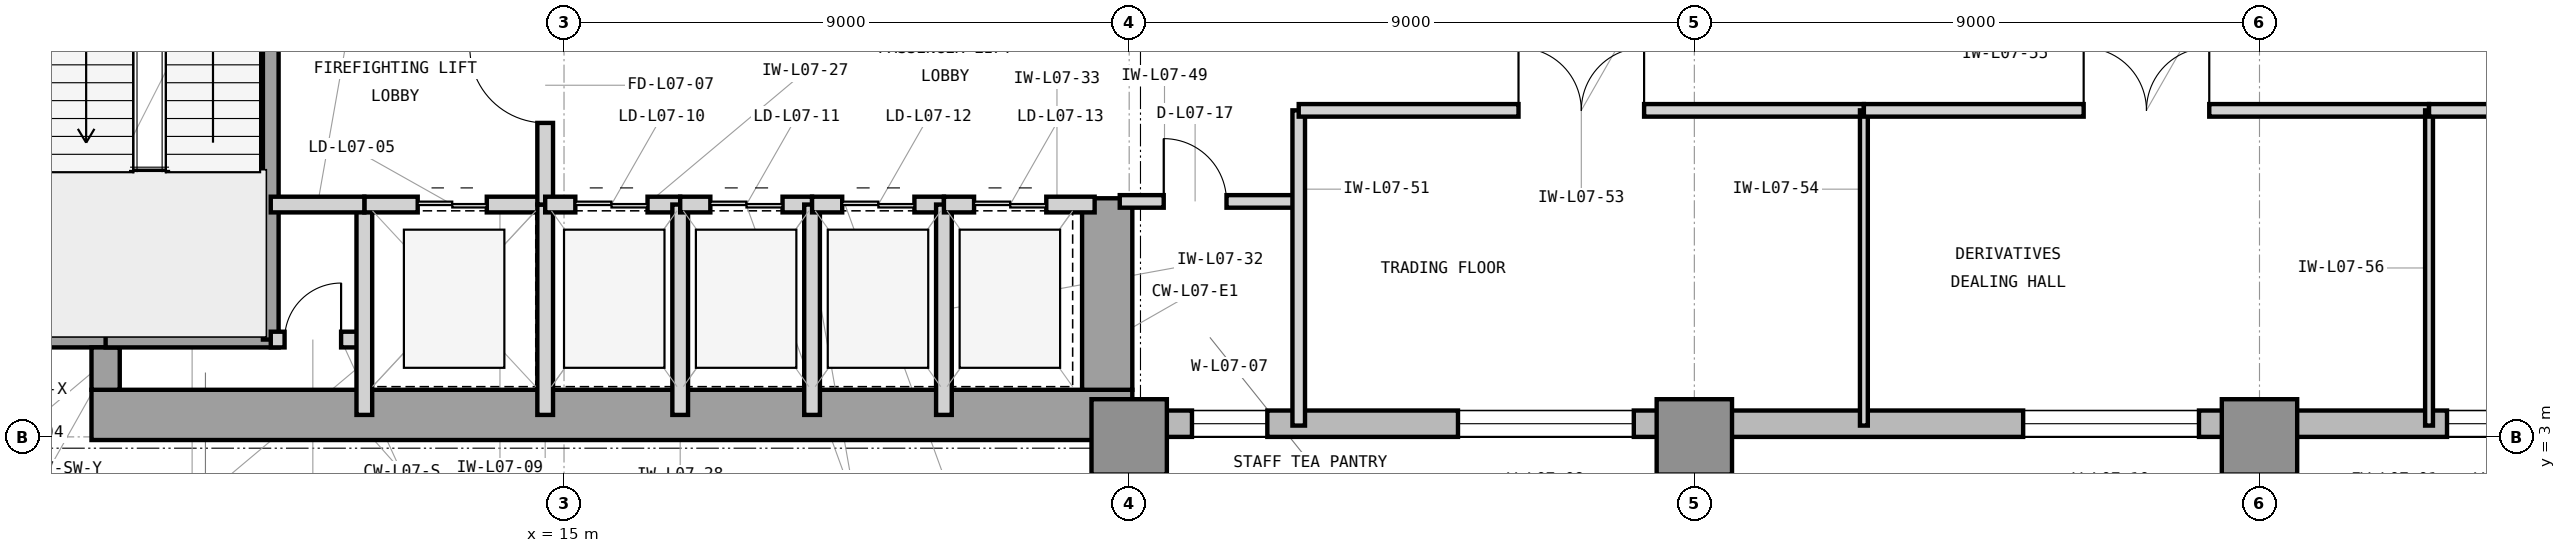
"""IFC4 building model, lengths in metres.
Left out: names, types, materials, properties, quantities, classifications, styles, units other than length and angle.
Written with IfcOpenShell. Run it as: python <this file> out.ifc"""

import sys

from ifc_helpers import new_model, si_unit, direction, frame, frame_2d, origin, origin_2d, place, context, subcontext, project, spatial, rectangle, extrude, element, fill, save


model = new_model("IFC4")
c1 = context("Model", 3, precision=1e-05, world=origin(), true_north=direction((0.0, 1.0)))
c2 = subcontext(c1, "Body", "Model", "MODEL_VIEW")
j1 = project(units=[si_unit("LENGTHUNIT", "METRE"), si_unit("PLANEANGLEUNIT", "RADIAN")], contexts=[c1])
p1 = place(None, origin())
s1 = spatial("IfcSite", under=j1, at=p1, CompositionType="ELEMENT")
p2 = place(p1, origin())
s2 = spatial("IfcBuilding", under=s1, at=p2, CompositionType="ELEMENT")
p3 = place(p2, frame((0.0, 0.0, 34.2)))
s3 = spatial("IfcBuildingStorey", under=s2, at=p3, CompositionType="ELEMENT", Elevation=34.2)
p4 = place(p3, frame((7.475, 3.35, 0.0), z_axis=(0.0, 0.0, 1.0), x_axis=(1.0, 0.0, 0.0)))
e1 = element("IfcWall", 1, at=p4, inside=s3, PredefinedType="SHEAR", context=c2, shape_type="SweptSolid", body=[
    extrude(rectangle(XDim=16.575, YDim=0.8, at=frame_2d((8.288, 0.0))), origin(), (0.0, 0.0, 1.0), 4.2),
])
p5 = place(p3, frame((23.65, 3.75, 0.0), z_axis=(0.0, 0.0, 1.0), x_axis=(0.0, 1.0, 0.0)))
e2 = element("IfcWall", 2, at=p5, inside=s3, PredefinedType="SHEAR", context=c2, shape_type="SweptSolid", body=[
    extrude(rectangle(XDim=3.05, YDim=0.8, at=frame_2d((1.525, 0.0))), origin(), (0.0, 0.0, 1.0), 4.2),
])
p6 = place(p3, frame((6.75, 4.65, 0.0), z_axis=(0.0, 0.0, 1.0), x_axis=(1.0, 0.0, 0.0)))
e3 = element("IfcWall", 3, at=p6, inside=s3, PredefinedType="SHEAR", context=c2, shape_type="SweptSolid", body=[
    extrude(rectangle(XDim=1.175, YDim=0.45, at=frame_2d((0.587, 0.0))), origin(), (0.0, 0.0, 1.0), 4.2),
])
p7 = place(p3, frame((7.7, 3.75, 0.0), z_axis=(0.0, 0.0, 1.0), x_axis=(0.0, 1.0, 0.0)))
e4 = element("IfcWall", 4, at=p7, inside=s3, PredefinedType="SHEAR", context=c2, shape_type="SweptSolid", body=[
    extrude(rectangle(XDim=0.675, YDim=0.45, at=frame_2d((0.337, 0.0))), origin(), (0.0, 0.0, 1.0), 4.2),
])
for number, where, z_axis, x_axis in (
    (5, (24.0, 3.0, 0.0), (0.0, 0.0, 1.0), (1.0, 0.0, 0.0)),
    (6, (33.0, 3.0, 0.0), (0.0, 0.0, 1.0), (1.0, 0.0, 0.0)),
    (7, (42.0, 3.0, 0.0), (0.0, 0.0, 1.0), (1.0, 0.0, 0.0)),
):
    element("IfcColumn", number, at=place(p3, frame(where, z_axis=z_axis, x_axis=x_axis)), inside=s3, PredefinedType="COLUMN", context=c2, shape_type="SweptSolid", body=[
        extrude(rectangle(XDim=1.2, YDim=1.2, at=origin_2d()), origin(), (0.0, 0.0, 1.0), 4.2),
    ])
p8 = place(p3, frame((23.9, 3.21, 0.0), z_axis=(0.0, 0.0, 1.0), x_axis=(1.0, 0.0, 0.0)))
e8 = element("IfcWall", 8, at=p8, inside=s3, PredefinedType="STANDARD", context=c2, shape_type="SweptSolid", body=[
    extrude(rectangle(XDim=40.5, YDim=0.42, at=frame_2d((20.25, 0.0))), origin(), (0.0, 0.0, 1.0), 3.98),
])
p9 = place(p8, frame((1.1, 0.0, 0.85)))
e9 = element("IfcOpeningElement", 9, at=p9, cuts=e8, PredefinedType="OPENING", context=c2, shape_type="SweptSolid", body=[
    extrude(rectangle(XDim=1.2, YDim=2.45, at=frame_2d((0.6, 1.225))), frame((0.0, 0.22, 0.0), z_axis=(0.0, -1.0, 0.0), x_axis=(1.0, 0.0, 0.0)), (0.0, 0.0, 1.0), 0.44),
])
p10 = place(p8, frame((5.336, 0.0, 0.85)))
e10 = element("IfcOpeningElement", 10, at=p10, cuts=e8, PredefinedType="OPENING", context=c2, shape_type="SweptSolid", body=[
    extrude(rectangle(XDim=2.8, YDim=2.45, at=frame_2d((1.4, 1.225))), frame((0.0, 0.22, 0.0), z_axis=(0.0, -1.0, 0.0), x_axis=(1.0, 0.0, 0.0)), (0.0, 0.0, 1.0), 0.44),
])
p11 = place(p8, frame((14.336, 0.0, 0.85)))
e11 = element("IfcOpeningElement", 11, at=p11, cuts=e8, PredefinedType="OPENING", context=c2, shape_type="SweptSolid", body=[
    extrude(rectangle(XDim=2.8, YDim=2.45, at=frame_2d((1.4, 1.225))), frame((0.0, 0.22, 0.0), z_axis=(0.0, -1.0, 0.0), x_axis=(1.0, 0.0, 0.0)), (0.0, 0.0, 1.0), 0.44),
])
p12 = place(p8, frame((21.086, 0.0, 0.85)))
e12 = element("IfcOpeningElement", 12, at=p12, cuts=e8, PredefinedType="OPENING", context=c2, shape_type="SweptSolid", body=[
    extrude(rectangle(XDim=2.1, YDim=2.45, at=frame_2d((1.05, 1.225))), frame((0.0, 0.22, 0.0), z_axis=(0.0, -1.0, 0.0), x_axis=(1.0, 0.0, 0.0)), (0.0, 0.0, 1.0), 0.44),
])
p13 = place(p3, frame((7.7, 4.55, 0.0), z_axis=(0.0, 0.0, 1.0), x_axis=(1.0, 0.0, 0.0)))
e13 = element("IfcWall", 13, at=p13, inside=s3, PredefinedType="SHEAR", context=c2, shape_type="SweptSolid", body=[
    extrude(rectangle(XDim=2.755, YDim=0.25, at=frame_2d((1.377, 0.0))), origin(), (0.0, 0.0, 1.0), 4.2),
])
p14 = place(p3, frame((10.33, 4.55, 0.0), z_axis=(0.0, 0.0, 1.0), x_axis=(0.0, 1.0, 0.0)))
e14 = element("IfcWall", 14, at=p14, inside=s3, PredefinedType="SHEAR", context=c2, shape_type="SweptSolid", body=[
    extrude(rectangle(XDim=7.45, YDim=0.25, at=frame_2d((3.725, 0.0))), origin(), (0.0, 0.0, 1.0), 4.2),
])
p15 = place(p14, frame((5.9, 0.0, 0.0)))
e15 = element("IfcOpeningElement", 15, at=p15, cuts=e14, PredefinedType="OPENING", context=c2, shape_type="SweptSolid", body=[
    extrude(rectangle(XDim=1.25, YDim=2.2, at=frame_2d((0.625, 1.1))), frame((0.0, 0.135, 0.0), z_axis=(0.0, -1.0, 0.0), x_axis=(1.0, 0.0, 0.0)), (0.0, 0.0, 1.0), 0.27),
])
p16 = place(p3, frame((10.33, 4.55, 0.0), z_axis=(0.0, 0.0, 1.0), x_axis=(1.0, 0.0, 0.0)))
e16 = element("IfcWall", 16, at=p16, inside=s3, PredefinedType="PARTITIONING", context=c2, shape_type="SweptSolid", body=[
    extrude(rectangle(XDim=1.49, YDim=0.25, at=frame_2d((0.745, 0.0))), origin(), (0.0, 0.0, 1.0), 3.97),
])
p17 = place(p16, frame((0.22, 0.0, 0.0)))
e17 = element("IfcOpeningElement", 17, at=p17, cuts=e16, PredefinedType="OPENING", context=c2, shape_type="SweptSolid", body=[
    extrude(rectangle(XDim=0.9, YDim=2.1, at=frame_2d((0.45, 1.05))), frame((0.0, 0.135, 0.0), z_axis=(0.0, -1.0, 0.0), x_axis=(1.0, 0.0, 0.0)), (0.0, 0.0, 1.0), 0.27),
])
p18 = place(p3, frame((11.82, 3.35, 0.0), z_axis=(0.0, 0.0, 1.0), x_axis=(0.0, 1.0, 0.0)))
e18 = element("IfcWall", 18, at=p18, inside=s3, PredefinedType="PARTITIONING", context=c2, shape_type="SweptSolid", body=[
    extrude(rectangle(XDim=3.35, YDim=0.25, at=frame_2d((1.675, 0.0))), origin(), (0.0, 0.0, 1.0), 3.97),
])
p19 = place(p3, frame((11.82, 6.7, 0.0), z_axis=(0.0, 0.0, 1.0), x_axis=(1.0, 0.0, 0.0)))
e19 = element("IfcWall", 19, at=p19, inside=s3, PredefinedType="PARTITIONING", context=c2, shape_type="SweptSolid", body=[
    extrude(rectangle(XDim=2.88, YDim=0.25, at=frame_2d((1.44, 0.0))), origin(), (0.0, 0.0, 1.0), 3.426),
])
p20 = place(p19, frame((0.85, 0.0, 0.0)))
e20 = element("IfcOpeningElement", 20, at=p20, cuts=e19, PredefinedType="OPENING", context=c2, shape_type="SweptSolid", body=[
    extrude(rectangle(XDim=1.1, YDim=2.25, at=frame_2d((0.55, 1.125))), frame((0.0, 0.135, 0.0), z_axis=(0.0, -1.0, 0.0), x_axis=(1.0, 0.0, 0.0)), (0.0, 0.0, 1.0), 0.27),
])
p21 = place(p3, frame((14.7, 3.35, 0.0), z_axis=(0.0, 0.0, 1.0), x_axis=(0.0, 1.0, 0.0)))
e21 = element("IfcWall", 21, at=p21, inside=s3, PredefinedType="PARTITIONING", context=c2, shape_type="SweptSolid", body=[
    extrude(rectangle(XDim=3.35, YDim=0.25, at=frame_2d((1.675, 0.0))), origin(), (0.0, 0.0, 1.0), 3.97),
])
p22 = place(p3, frame((14.7, 6.7, 0.0), z_axis=(0.0, 0.0, 1.0), x_axis=(0.0, 1.0, 0.0)))
e22 = element("IfcWall", 22, at=p22, inside=s3, PredefinedType="PARTITIONING", context=c2, shape_type="SweptSolid", body=[
    extrude(rectangle(XDim=3.8, YDim=0.25, at=frame_2d((1.9, 0.0))), origin(), (0.0, 0.0, 1.0), 3.97),
])
p23 = place(p22, frame((1.3, 0.0, 0.0)))
e23 = element("IfcOpeningElement", 23, at=p23, cuts=e22, PredefinedType="OPENING", context=c2, shape_type="SweptSolid", body=[
    extrude(rectangle(XDim=1.2, YDim=2.2, at=frame_2d((0.6, 1.1))), frame((0.0, 0.135, 0.0), z_axis=(0.0, -1.0, 0.0), x_axis=(1.0, 0.0, 0.0)), (0.0, 0.0, 1.0), 0.27),
])
p24 = place(p3, frame((10.33, 6.7, 0.0), z_axis=(0.0, 0.0, 1.0), x_axis=(1.0, 0.0, 0.0)))
e24 = element("IfcWall", 24, at=p24, inside=s3, PredefinedType="PARTITIONING", context=c2, shape_type="SweptSolid", body=[
    extrude(rectangle(XDim=1.49, YDim=0.25, at=frame_2d((0.745, 0.0))), origin(), (0.0, 0.0, 1.0), 3.426),
])
p25 = place(p3, frame((14.7, 6.7, 0.0), z_axis=(0.0, 0.0, 1.0), x_axis=(1.0, 0.0, 0.0)))
e25 = element("IfcWall", 25, at=p25, inside=s3, PredefinedType="PARTITIONING", context=c2, shape_type="SweptSolid", body=[
    extrude(rectangle(XDim=2.15, YDim=0.25, at=frame_2d((1.075, 0.0))), origin(), (0.0, 0.0, 1.0), 3.426),
])
p26 = place(p25, frame((0.48, 0.0, 0.0)))
e26 = element("IfcOpeningElement", 26, at=p26, cuts=e25, PredefinedType="OPENING", context=c2, shape_type="SweptSolid", body=[
    extrude(rectangle(XDim=1.15, YDim=2.25, at=frame_2d((0.575, 1.125))), frame((0.0, 0.135, 0.0), z_axis=(0.0, -1.0, 0.0), x_axis=(1.0, 0.0, 0.0)), (0.0, 0.0, 1.0), 0.27),
])
p27 = place(p3, frame((16.85, 3.35, 0.0), z_axis=(0.0, 0.0, 1.0), x_axis=(0.0, 1.0, 0.0)))
e27 = element("IfcWall", 27, at=p27, inside=s3, PredefinedType="PARTITIONING", context=c2, shape_type="SweptSolid", body=[
    extrude(rectangle(XDim=3.35, YDim=0.25, at=frame_2d((1.675, 0.0))), origin(), (0.0, 0.0, 1.0), 3.97),
])
p28 = place(p3, frame((16.85, 6.7, 0.0), z_axis=(0.0, 0.0, 1.0), x_axis=(1.0, 0.0, 0.0)))
e28 = element("IfcWall", 28, at=p28, inside=s3, PredefinedType="PARTITIONING", context=c2, shape_type="SweptSolid", body=[
    extrude(rectangle(XDim=2.1, YDim=0.25, at=frame_2d((1.05, 0.0))), origin(), (0.0, 0.0, 1.0), 3.426),
])
p29 = place(p28, frame((0.48, 0.0, 0.0)))
e29 = element("IfcOpeningElement", 29, at=p29, cuts=e28, PredefinedType="OPENING", context=c2, shape_type="SweptSolid", body=[
    extrude(rectangle(XDim=1.15, YDim=2.25, at=frame_2d((0.575, 1.125))), frame((0.0, 0.135, 0.0), z_axis=(0.0, -1.0, 0.0), x_axis=(1.0, 0.0, 0.0)), (0.0, 0.0, 1.0), 0.27),
])
p30 = place(p3, frame((18.95, 3.35, 0.0), z_axis=(0.0, 0.0, 1.0), x_axis=(0.0, 1.0, 0.0)))
e30 = element("IfcWall", 30, at=p30, inside=s3, PredefinedType="PARTITIONING", context=c2, shape_type="SweptSolid", body=[
    extrude(rectangle(XDim=3.35, YDim=0.25, at=frame_2d((1.675, 0.0))), origin(), (0.0, 0.0, 1.0), 3.97),
])
p31 = place(p3, frame((18.95, 6.7, 0.0), z_axis=(0.0, 0.0, 1.0), x_axis=(1.0, 0.0, 0.0)))
e31 = element("IfcWall", 31, at=p31, inside=s3, PredefinedType="PARTITIONING", context=c2, shape_type="SweptSolid", body=[
    extrude(rectangle(XDim=2.1, YDim=0.25, at=frame_2d((1.05, 0.0))), origin(), (0.0, 0.0, 1.0), 3.426),
])
p32 = place(p31, frame((0.48, 0.0, 0.0)))
e32 = element("IfcOpeningElement", 32, at=p32, cuts=e31, PredefinedType="OPENING", context=c2, shape_type="SweptSolid", body=[
    extrude(rectangle(XDim=1.15, YDim=2.25, at=frame_2d((0.575, 1.125))), frame((0.0, 0.135, 0.0), z_axis=(0.0, -1.0, 0.0), x_axis=(1.0, 0.0, 0.0)), (0.0, 0.0, 1.0), 0.27),
])
p33 = place(p3, frame((21.05, 3.35, 0.0), z_axis=(0.0, 0.0, 1.0), x_axis=(0.0, 1.0, 0.0)))
e33 = element("IfcWall", 33, at=p33, inside=s3, PredefinedType="PARTITIONING", context=c2, shape_type="SweptSolid", body=[
    extrude(rectangle(XDim=3.35, YDim=0.25, at=frame_2d((1.675, 0.0))), origin(), (0.0, 0.0, 1.0), 3.97),
])
p34 = place(p3, frame((21.05, 6.7, 0.0), z_axis=(0.0, 0.0, 1.0), x_axis=(1.0, 0.0, 0.0)))
e34 = element("IfcWall", 34, at=p34, inside=s3, PredefinedType="PARTITIONING", context=c2, shape_type="SweptSolid", body=[
    extrude(rectangle(XDim=2.4, YDim=0.25, at=frame_2d((1.2, 0.0))), origin(), (0.0, 0.0, 1.0), 3.426),
])
p35 = place(p34, frame((0.48, 0.0, 0.0)))
e35 = element("IfcOpeningElement", 35, at=p35, cuts=e34, PredefinedType="OPENING", context=c2, shape_type="SweptSolid", body=[
    extrude(rectangle(XDim=1.15, YDim=2.25, at=frame_2d((0.575, 1.125))), frame((0.0, 0.135, 0.0), z_axis=(0.0, -1.0, 0.0), x_axis=(1.0, 0.0, 0.0)), (0.0, 0.0, 1.0), 0.27),
])
p36 = place(p3, frame((23.85, 6.75, 0.0), z_axis=(0.0, 0.0, 1.0), x_axis=(1.0, 0.0, 0.0)))
e36 = element("IfcWall", 36, at=p36, inside=s3, PredefinedType="PARTITIONING", context=c2, shape_type="SweptSolid", body=[
    extrude(rectangle(XDim=2.85, YDim=0.2, at=frame_2d((1.425, 0.0))), origin(), (0.0, 0.0, 1.0), 3.97),
])
p37 = place(p36, frame((0.7, 0.0, 0.0)))
e37 = element("IfcOpeningElement", 37, at=p37, cuts=e36, PredefinedType="OPENING", context=c2, shape_type="SweptSolid", body=[
    extrude(rectangle(XDim=1.0, YDim=2.15, at=frame_2d((0.5, 1.075))), frame((0.0, 0.11, 0.0), z_axis=(0.0, -1.0, 0.0), x_axis=(1.0, 0.0, 0.0)), (0.0, 0.0, 1.0), 0.22),
])
p38 = place(p3, frame((26.7, 3.18, 0.0), z_axis=(0.0, 0.0, 1.0), x_axis=(0.0, 1.0, 0.0)))
e38 = element("IfcWall", 38, at=p38, inside=s3, PredefinedType="PARTITIONING", context=c2, shape_type="SweptSolid", body=[
    extrude(rectangle(XDim=5.02, YDim=0.2, at=frame_2d((2.51, 0.0))), origin(), (0.0, 0.0, 1.0), 3.97),
])
p39 = place(p3, frame((26.7, 8.2, 0.0), z_axis=(0.0, 0.0, 1.0), x_axis=(1.0, 0.0, 0.0)))
e39 = element("IfcWall", 39, at=p39, inside=s3, PredefinedType="PARTITIONING", context=c2, shape_type="SweptSolid", body=[
    extrude(rectangle(XDim=9.0, YDim=0.2, at=frame_2d((4.5, 0.0))), origin(), (0.0, 0.0, 1.0), 3.97),
])
p40 = place(p39, frame((3.5, 0.0, 0.0)))
e40 = element("IfcOpeningElement", 40, at=p40, cuts=e39, PredefinedType="OPENING", context=c2, shape_type="SweptSolid", body=[
    extrude(rectangle(XDim=2.0, YDim=2.5, at=frame_2d((1.0, 1.25))), frame((0.0, 0.11, 0.0), z_axis=(0.0, -1.0, 0.0), x_axis=(1.0, 0.0, 0.0)), (0.0, 0.0, 1.0), 0.22),
])
p41 = place(p3, frame((35.7, 3.18, 0.0), z_axis=(0.0, 0.0, 1.0), x_axis=(0.0, 1.0, 0.0)))
e41 = element("IfcWall", 41, at=p41, inside=s3, PredefinedType="PARTITIONING", context=c2, shape_type="SweptSolid", body=[
    extrude(rectangle(XDim=5.02, YDim=0.125, at=frame_2d((2.51, 0.0))), origin(), (0.0, 0.0, 1.0), 3.97),
])
p42 = place(p3, frame((35.7, 8.2, 0.0), z_axis=(0.0, 0.0, 1.0), x_axis=(1.0, 0.0, 0.0)))
e42 = element("IfcWall", 42, at=p42, inside=s3, PredefinedType="PARTITIONING", context=c2, shape_type="SweptSolid", body=[
    extrude(rectangle(XDim=9.0, YDim=0.2, at=frame_2d((4.5, 0.0))), origin(), (0.0, 0.0, 1.0), 3.97),
])
p43 = place(p42, frame((3.5, 0.0, 0.0)))
e43 = element("IfcOpeningElement", 43, at=p43, cuts=e42, PredefinedType="OPENING", context=c2, shape_type="SweptSolid", body=[
    extrude(rectangle(XDim=2.0, YDim=2.5, at=frame_2d((1.0, 1.25))), frame((0.0, 0.11, 0.0), z_axis=(0.0, -1.0, 0.0), x_axis=(1.0, 0.0, 0.0)), (0.0, 0.0, 1.0), 0.22),
])
p44 = place(p3, frame((44.7, 3.18, 0.0), z_axis=(0.0, 0.0, 1.0), x_axis=(0.0, 1.0, 0.0)))
e44 = element("IfcWall", 44, at=p44, inside=s3, PredefinedType="PARTITIONING", context=c2, shape_type="SweptSolid", body=[
    extrude(rectangle(XDim=5.02, YDim=0.125, at=frame_2d((2.51, 0.0))), origin(), (0.0, 0.0, 1.0), 3.97),
])
p45 = place(p3, frame((44.7, 8.2, 0.0), z_axis=(0.0, 0.0, 1.0), x_axis=(1.0, 0.0, 0.0)))
e45 = element("IfcWall", 45, at=p45, inside=s3, PredefinedType="PARTITIONING", context=c2, shape_type="SweptSolid", body=[
    extrude(rectangle(XDim=12.3, YDim=0.2, at=frame_2d((6.15, 0.0))), origin(), (0.0, 0.0, 1.0), 3.97),
])
p46 = place(p45, frame((5.65, 0.0, 0.0)))
e46 = element("IfcOpeningElement", 46, at=p46, cuts=e45, PredefinedType="OPENING", context=c2, shape_type="SweptSolid", body=[
    extrude(rectangle(XDim=1.0, YDim=2.15, at=frame_2d((0.5, 1.075))), frame((0.0, 0.11, 0.0), z_axis=(0.0, -1.0, 0.0), x_axis=(1.0, 0.0, 0.0)), (0.0, 0.0, 1.0), 0.22),
])
p47 = place(p17, origin())
e47 = element("IfcDoor", 47, at=p47, inside=s3, OperationType="SINGLE_SWING_RIGHT", PredefinedType="TRAPDOOR", context=c2, shape_type="SweptSolid", body=[
    extrude(rectangle(XDim=0.9, YDim=2.1, at=frame_2d((0.45, 1.05))), frame((0.0, 0.025, 0.0), z_axis=(0.0, -1.0, 0.0), x_axis=(1.0, 0.0, 0.0)), (0.0, 0.0, 1.0), 0.05),
])
fill(e17, e47)
p48 = place(p20, origin())
e48 = element("IfcDoor", 48, at=p48, inside=s3, OperationType="DOUBLE_DOOR_SLIDING", PredefinedType="DOOR", context=c2, shape_type="SweptSolid", body=[
    extrude(rectangle(XDim=1.1, YDim=2.25, at=frame_2d((0.55, 1.125))), frame((0.0, 0.025, 0.0), z_axis=(0.0, -1.0, 0.0), x_axis=(1.0, 0.0, 0.0)), (0.0, 0.0, 1.0), 0.05),
])
fill(e20, e48)
p49 = place(p23, origin())
e49 = element("IfcDoor", 49, at=p49, inside=s3, OperationType="SINGLE_SWING_RIGHT", PredefinedType="DOOR", context=c2, shape_type="SweptSolid", body=[
    extrude(rectangle(XDim=1.2, YDim=2.2, at=frame_2d((0.6, 1.1))), frame((0.0, 0.025, 0.0), z_axis=(0.0, -1.0, 0.0), x_axis=(1.0, 0.0, 0.0)), (0.0, 0.0, 1.0), 0.05),
])
fill(e23, e49)
p50 = place(p26, origin())
e50 = element("IfcDoor", 50, at=p50, inside=s3, OperationType="DOUBLE_DOOR_SLIDING", PredefinedType="DOOR", context=c2, shape_type="SweptSolid", body=[
    extrude(rectangle(XDim=1.15, YDim=2.25, at=frame_2d((0.575, 1.125))), frame((0.0, 0.025, 0.0), z_axis=(0.0, -1.0, 0.0), x_axis=(1.0, 0.0, 0.0)), (0.0, 0.0, 1.0), 0.05),
])
fill(e26, e50)
p51 = place(p29, origin())
e51 = element("IfcDoor", 51, at=p51, inside=s3, OperationType="DOUBLE_DOOR_SLIDING", PredefinedType="DOOR", context=c2, shape_type="SweptSolid", body=[
    extrude(rectangle(XDim=1.15, YDim=2.25, at=frame_2d((0.575, 1.125))), frame((0.0, 0.025, 0.0), z_axis=(0.0, -1.0, 0.0), x_axis=(1.0, 0.0, 0.0)), (0.0, 0.0, 1.0), 0.05),
])
fill(e29, e51)
p52 = place(p32, origin())
e52 = element("IfcDoor", 52, at=p52, inside=s3, OperationType="DOUBLE_DOOR_SLIDING", PredefinedType="DOOR", context=c2, shape_type="SweptSolid", body=[
    extrude(rectangle(XDim=1.15, YDim=2.25, at=frame_2d((0.575, 1.125))), frame((0.0, 0.025, 0.0), z_axis=(0.0, -1.0, 0.0), x_axis=(1.0, 0.0, 0.0)), (0.0, 0.0, 1.0), 0.05),
])
fill(e32, e52)
p53 = place(p35, origin())
e53 = element("IfcDoor", 53, at=p53, inside=s3, OperationType="DOUBLE_DOOR_SLIDING", PredefinedType="DOOR", context=c2, shape_type="SweptSolid", body=[
    extrude(rectangle(XDim=1.15, YDim=2.25, at=frame_2d((0.575, 1.125))), frame((0.0, 0.025, 0.0), z_axis=(0.0, -1.0, 0.0), x_axis=(1.0, 0.0, 0.0)), (0.0, 0.0, 1.0), 0.05),
])
fill(e35, e53)
p54 = place(p37, origin())
e54 = element("IfcDoor", 54, at=p54, inside=s3, OperationType="SINGLE_SWING_LEFT", PredefinedType="DOOR", context=c2, shape_type="SweptSolid", body=[
    extrude(rectangle(XDim=1.0, YDim=2.15, at=frame_2d((0.5, 1.075))), frame((0.0, 0.025, 0.0), z_axis=(0.0, -1.0, 0.0), x_axis=(1.0, 0.0, 0.0)), (0.0, 0.0, 1.0), 0.05),
])
fill(e37, e54)
p55 = place(p40, origin())
e55 = element("IfcDoor", 55, at=p55, inside=s3, OperationType="DOUBLE_DOOR_SINGLE_SWING", PredefinedType="DOOR", context=c2, shape_type="SweptSolid", body=[
    extrude(rectangle(XDim=2.0, YDim=2.5, at=frame_2d((1.0, 1.25))), frame((0.0, 0.025, 0.0), z_axis=(0.0, -1.0, 0.0), x_axis=(1.0, 0.0, 0.0)), (0.0, 0.0, 1.0), 0.05),
])
fill(e40, e55)
p56 = place(p43, origin())
e56 = element("IfcDoor", 56, at=p56, inside=s3, OperationType="DOUBLE_DOOR_SINGLE_SWING", PredefinedType="DOOR", context=c2, shape_type="SweptSolid", body=[
    extrude(rectangle(XDim=2.0, YDim=2.5, at=frame_2d((1.0, 1.25))), frame((0.0, 0.025, 0.0), z_axis=(0.0, -1.0, 0.0), x_axis=(1.0, 0.0, 0.0)), (0.0, 0.0, 1.0), 0.05),
])
fill(e43, e56)
p57 = place(p9, origin())
e57 = element("IfcWindow", 57, at=p57, inside=s3, PartitioningType="SINGLE_PANEL", PredefinedType="WINDOW", context=c2, shape_type="SweptSolid", body=[
    extrude(rectangle(XDim=1.2, YDim=2.45, at=frame_2d((0.6, 1.225))), frame((0.0, 0.11, 0.0), z_axis=(0.0, -1.0, 0.0), x_axis=(1.0, 0.0, 0.0)), (0.0, 0.0, 1.0), 0.06),
])
fill(e9, e57)
p58 = place(p10, origin())
e58 = element("IfcWindow", 58, at=p58, inside=s3, PartitioningType="SINGLE_PANEL", PredefinedType="WINDOW", context=c2, shape_type="SweptSolid", body=[
    extrude(rectangle(XDim=2.8, YDim=2.45, at=frame_2d((1.4, 1.225))), frame((0.0, 0.11, 0.0), z_axis=(0.0, -1.0, 0.0), x_axis=(1.0, 0.0, 0.0)), (0.0, 0.0, 1.0), 0.06),
])
fill(e10, e58)
p59 = place(p11, origin())
e59 = element("IfcWindow", 59, at=p59, inside=s3, PartitioningType="SINGLE_PANEL", PredefinedType="WINDOW", context=c2, shape_type="SweptSolid", body=[
    extrude(rectangle(XDim=2.8, YDim=2.45, at=frame_2d((1.4, 1.225))), frame((0.0, 0.11, 0.0), z_axis=(0.0, -1.0, 0.0), x_axis=(1.0, 0.0, 0.0)), (0.0, 0.0, 1.0), 0.06),
])
fill(e11, e59)
p60 = place(p12, origin())
e60 = element("IfcWindow", 60, at=p60, inside=s3, PartitioningType="SINGLE_PANEL", PredefinedType="WINDOW", context=c2, shape_type="SweptSolid", body=[
    extrude(rectangle(XDim=2.1, YDim=2.45, at=frame_2d((1.05, 1.225))), frame((0.0, 0.11, 0.0), z_axis=(0.0, -1.0, 0.0), x_axis=(1.0, 0.0, 0.0)), (0.0, 0.0, 1.0), 0.06),
])
fill(e12, e60)
save(model, sys.argv[1])
